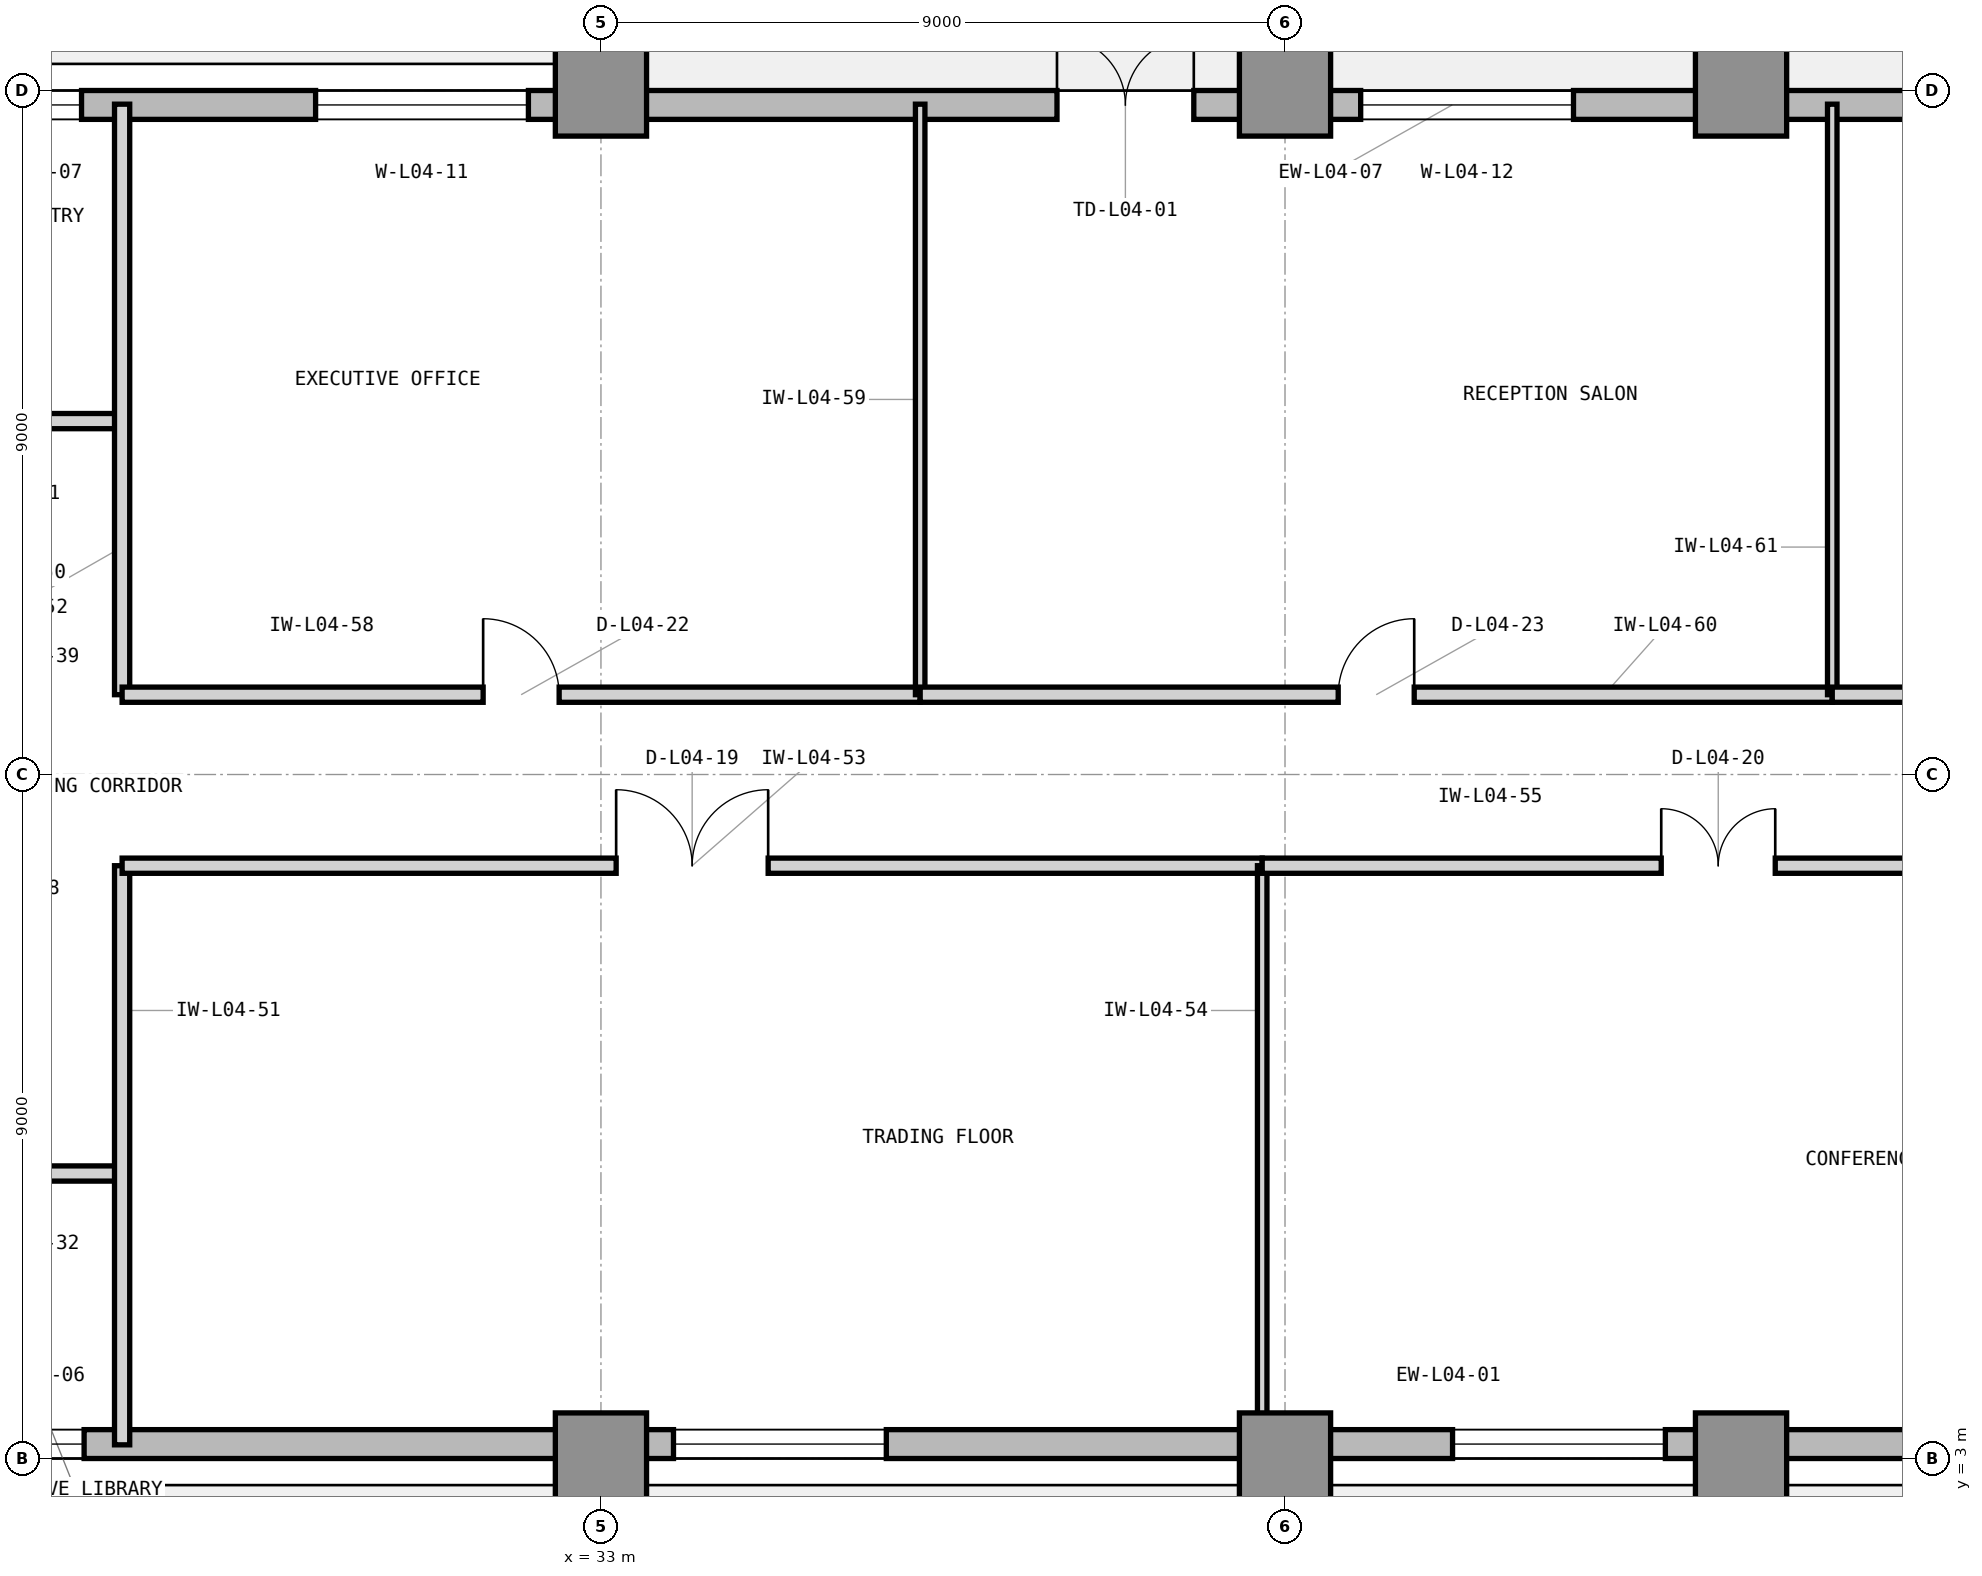
"""IFC4 building model, lengths in metres.
Left out: names, types, materials, properties, quantities, classifications, styles, units other than length and angle.
Written with IfcOpenShell. Run it as: python <this file> out.ifc"""

import sys

from ifc_helpers import new_model, si_unit, direction, frame, frame_2d, origin, origin_2d, place, context, subcontext, project, spatial, rectangle, extrude, element, fill, save


model = new_model("IFC4")
c1 = context("Model", 3, precision=1e-05, world=origin(), true_north=direction((0.0, 1.0)))
c2 = subcontext(c1, "Body", "Model", "MODEL_VIEW")
j1 = project(units=[si_unit("LENGTHUNIT", "METRE"), si_unit("PLANEANGLEUNIT", "RADIAN")], contexts=[c1])
p1 = place(None, origin())
s1 = spatial("IfcSite", under=j1, at=p1, CompositionType="ELEMENT")
p2 = place(p1, origin())
s2 = spatial("IfcBuilding", under=s1, at=p2, CompositionType="ELEMENT")
p3 = place(p2, frame((0.0, 0.0, 21.6)))
s3 = spatial("IfcBuildingStorey", under=s2, at=p3, CompositionType="ELEMENT", Elevation=21.6)
for number, where, z_axis, x_axis in (
    (1, (33.0, 3.0, 0.0), (0.0, 0.0, 1.0), (1.0, 0.0, 0.0)),
    (2, (33.0, 21.0, 0.0), (0.0, 0.0, 1.0), (1.0, 0.0, 0.0)),
    (3, (42.0, 3.0, 0.0), (0.0, 0.0, 1.0), (1.0, 0.0, 0.0)),
    (4, (42.0, 21.0, 0.0), (0.0, 0.0, 1.0), (1.0, 0.0, 0.0)),
    (5, (48.0, 3.0, 0.0), (0.0, 0.0, 1.0), (1.0, 0.0, 0.0)),
    (6, (48.0, 21.0, 0.0), (0.0, 0.0, 1.0), (1.0, 0.0, 0.0)),
):
    element("IfcColumn", number, at=place(p3, frame(where, z_axis=z_axis, x_axis=x_axis)), inside=s3, PredefinedType="COLUMN", context=c2, shape_type="SweptSolid", body=[
        extrude(rectangle(XDim=1.2, YDim=1.2, at=origin_2d()), origin(), (0.0, 0.0, 1.0), 4.2),
    ])
p4 = place(p3, frame((23.9, 3.19, 0.0), z_axis=(0.0, 0.0, 1.0), x_axis=(1.0, 0.0, 0.0)))
e7 = element("IfcWall", 7, at=p4, inside=s3, PredefinedType="STANDARD", context=c2, shape_type="SweptSolid", body=[
    extrude(rectangle(XDim=40.5, YDim=0.38, at=frame_2d((20.25, 0.0))), origin(), (0.0, 0.0, 1.0), 3.98),
])
p5 = place(p4, frame((1.1, 0.0, 0.85)))
e8 = element("IfcOpeningElement", 8, at=p5, cuts=e7, PredefinedType="OPENING", context=c2, shape_type="SweptSolid", body=[
    extrude(rectangle(XDim=1.2, YDim=2.45, at=frame_2d((0.6, 1.225))), frame((0.0, 0.2, 0.0), z_axis=(0.0, -1.0, 0.0), x_axis=(1.0, 0.0, 0.0)), (0.0, 0.0, 1.0), 0.4),
])
p6 = place(p4, frame((10.054, 0.0, 0.85)))
e9 = element("IfcOpeningElement", 9, at=p6, cuts=e7, PredefinedType="OPENING", context=c2, shape_type="SweptSolid", body=[
    extrude(rectangle(XDim=2.8, YDim=2.45, at=frame_2d((1.4, 1.225))), frame((0.0, 0.2, 0.0), z_axis=(0.0, -1.0, 0.0), x_axis=(1.0, 0.0, 0.0)), (0.0, 0.0, 1.0), 0.4),
])
p7 = place(p4, frame((20.304, 0.0, 0.85)))
e10 = element("IfcOpeningElement", 10, at=p7, cuts=e7, PredefinedType="OPENING", context=c2, shape_type="SweptSolid", body=[
    extrude(rectangle(XDim=2.8, YDim=2.45, at=frame_2d((1.4, 1.225))), frame((0.0, 0.2, 0.0), z_axis=(0.0, -1.0, 0.0), x_axis=(1.0, 0.0, 0.0)), (0.0, 0.0, 1.0), 0.4),
])
p8 = place(p4, frame((31.104, 0.0, 0.85)))
e11 = element("IfcOpeningElement", 11, at=p8, cuts=e7, PredefinedType="OPENING", context=c2, shape_type="SweptSolid", body=[
    extrude(rectangle(XDim=1.2, YDim=2.45, at=frame_2d((0.6, 1.225))), frame((0.0, 0.2, 0.0), z_axis=(0.0, -1.0, 0.0), x_axis=(1.0, 0.0, 0.0)), (0.0, 0.0, 1.0), 0.4),
])
p9 = place(p3, frame((64.4, 20.81, 0.0), z_axis=(0.0, 0.0, 1.0), x_axis=(-1.0, 0.0, 0.0)))
e12 = element("IfcWall", 12, at=p9, inside=s3, PredefinedType="STANDARD", context=c2, shape_type="SweptSolid", body=[
    extrude(rectangle(XDim=40.4, YDim=0.38, at=frame_2d((20.2, 0.0))), origin(), (0.0, 0.0, 1.0), 3.98),
])
p10 = place(p9, frame((23.6, 0.0, 0.0)))
e13 = element("IfcOpeningElement", 13, at=p10, cuts=e12, PredefinedType="OPENING", context=c2, shape_type="SweptSolid", body=[
    extrude(rectangle(XDim=1.8, YDim=2.35, at=frame_2d((0.9, 1.175))), frame((0.0, 0.2, 0.0), z_axis=(0.0, -1.0, 0.0), x_axis=(1.0, 0.0, 0.0)), (0.0, 0.0, 1.0), 0.4),
])
p11 = place(p9, frame((38.234, 0.0, 0.85)))
e14 = element("IfcOpeningElement", 14, at=p11, cuts=e12, PredefinedType="OPENING", context=c2, shape_type="SweptSolid", body=[
    extrude(rectangle(XDim=1.2, YDim=2.45, at=frame_2d((0.6, 1.225))), frame((0.0, 0.2, 0.0), z_axis=(0.0, -1.0, 0.0), x_axis=(1.0, 0.0, 0.0)), (0.0, 0.0, 1.0), 0.4),
])
p12 = place(p9, frame((32.354, 0.0, 0.85)))
e15 = element("IfcOpeningElement", 15, at=p12, cuts=e12, PredefinedType="OPENING", context=c2, shape_type="SweptSolid", body=[
    extrude(rectangle(XDim=2.8, YDim=2.45, at=frame_2d((1.4, 1.225))), frame((0.0, 0.2, 0.0), z_axis=(0.0, -1.0, 0.0), x_axis=(1.0, 0.0, 0.0)), (0.0, 0.0, 1.0), 0.4),
])
p13 = place(p9, frame((18.604, 0.0, 0.85)))
e16 = element("IfcOpeningElement", 16, at=p13, cuts=e12, PredefinedType="OPENING", context=c2, shape_type="SweptSolid", body=[
    extrude(rectangle(XDim=2.8, YDim=2.45, at=frame_2d((1.4, 1.225))), frame((0.0, 0.2, 0.0), z_axis=(0.0, -1.0, 0.0), x_axis=(1.0, 0.0, 0.0)), (0.0, 0.0, 1.0), 0.4),
])
p14 = place(p9, frame((11.154, 0.0, 0.85)))
e17 = element("IfcOpeningElement", 17, at=p14, cuts=e12, PredefinedType="OPENING", context=c2, shape_type="SweptSolid", body=[
    extrude(rectangle(XDim=1.2, YDim=2.45, at=frame_2d((0.6, 1.225))), frame((0.0, 0.2, 0.0), z_axis=(0.0, -1.0, 0.0), x_axis=(1.0, 0.0, 0.0)), (0.0, 0.0, 1.0), 0.4),
])
p15 = place(p3, frame((23.85, 6.75, 0.0), z_axis=(0.0, 0.0, 1.0), x_axis=(1.0, 0.0, 0.0)))
e18 = element("IfcWall", 18, at=p15, inside=s3, PredefinedType="PARTITIONING", context=c2, shape_type="SweptSolid", body=[
    extrude(rectangle(XDim=2.85, YDim=0.2, at=frame_2d((1.425, 0.0))), origin(), (0.0, 0.0, 1.0), 3.97),
])
p16 = place(p15, frame((0.7, 0.0, 0.0)))
e19 = element("IfcOpeningElement", 19, at=p16, cuts=e18, PredefinedType="OPENING", context=c2, shape_type="SweptSolid", body=[
    extrude(rectangle(XDim=1.0, YDim=2.15, at=frame_2d((0.5, 1.075))), frame((0.0, 0.11, 0.0), z_axis=(0.0, -1.0, 0.0), x_axis=(1.0, 0.0, 0.0)), (0.0, 0.0, 1.0), 0.22),
])
p17 = place(p3, frame((23.85, 16.65, 0.0), z_axis=(0.0, 0.0, 1.0), x_axis=(1.0, 0.0, 0.0)))
e20 = element("IfcWall", 20, at=p17, inside=s3, PredefinedType="PARTITIONING", context=c2, shape_type="SweptSolid", body=[
    extrude(rectangle(XDim=2.85, YDim=0.2, at=frame_2d((1.425, 0.0))), origin(), (0.0, 0.0, 1.0), 3.97),
])
p18 = place(p17, frame((0.7, 0.0, 0.0)))
e21 = element("IfcOpeningElement", 21, at=p18, cuts=e20, PredefinedType="OPENING", context=c2, shape_type="SweptSolid", body=[
    extrude(rectangle(XDim=1.0, YDim=2.15, at=frame_2d((0.5, 1.075))), frame((0.0, 0.11, 0.0), z_axis=(0.0, -1.0, 0.0), x_axis=(1.0, 0.0, 0.0)), (0.0, 0.0, 1.0), 0.22),
])
p19 = place(p3, frame((26.7, 3.18, 0.0), z_axis=(0.0, 0.0, 1.0), x_axis=(0.0, 1.0, 0.0)))
e22 = element("IfcWall", 22, at=p19, inside=s3, PredefinedType="PARTITIONING", context=c2, shape_type="SweptSolid", body=[
    extrude(rectangle(XDim=7.62, YDim=0.2, at=frame_2d((3.81, 0.0))), origin(), (0.0, 0.0, 1.0), 3.97),
])
p20 = place(p3, frame((26.7, 13.05, 0.0), z_axis=(0.0, 0.0, 1.0), x_axis=(0.0, 1.0, 0.0)))
e23 = element("IfcWall", 23, at=p20, inside=s3, PredefinedType="PARTITIONING", context=c2, shape_type="SweptSolid", body=[
    extrude(rectangle(XDim=7.77, YDim=0.2, at=frame_2d((3.885, 0.0))), origin(), (0.0, 0.0, 1.0), 3.97),
])
p21 = place(p3, frame((26.7, 10.8, 0.0), z_axis=(0.0, 0.0, 1.0), x_axis=(1.0, 0.0, 0.0)))
e24 = element("IfcWall", 24, at=p21, inside=s3, PredefinedType="PARTITIONING", context=c2, shape_type="SweptSolid", body=[
    extrude(rectangle(XDim=15.0, YDim=0.2, at=frame_2d((7.5, 0.0))), origin(), (0.0, 0.0, 1.0), 3.97),
])
p22 = place(p21, frame((6.5, 0.0, 0.0)))
e25 = element("IfcOpeningElement", 25, at=p22, cuts=e24, PredefinedType="OPENING", context=c2, shape_type="SweptSolid", body=[
    extrude(rectangle(XDim=2.0, YDim=2.5, at=frame_2d((1.0, 1.25))), frame((0.0, 0.11, 0.0), z_axis=(0.0, -1.0, 0.0), x_axis=(1.0, 0.0, 0.0)), (0.0, 0.0, 1.0), 0.22),
])
p23 = place(p3, frame((41.7, 3.18, 0.0), z_axis=(0.0, 0.0, 1.0), x_axis=(0.0, 1.0, 0.0)))
e26 = element("IfcWall", 26, at=p23, inside=s3, PredefinedType="PARTITIONING", context=c2, shape_type="SweptSolid", body=[
    extrude(rectangle(XDim=7.62, YDim=0.125, at=frame_2d((3.81, 0.0))), origin(), (0.0, 0.0, 1.0), 3.97),
])
p24 = place(p3, frame((41.7, 10.8, 0.0), z_axis=(0.0, 0.0, 1.0), x_axis=(1.0, 0.0, 0.0)))
e27 = element("IfcWall", 27, at=p24, inside=s3, PredefinedType="PARTITIONING", context=c2, shape_type="SweptSolid", body=[
    extrude(rectangle(XDim=12.0, YDim=0.2, at=frame_2d((6.0, 0.0))), origin(), (0.0, 0.0, 1.0), 3.97),
])
p25 = place(p24, frame((5.25, 0.0, 0.0)))
e28 = element("IfcOpeningElement", 28, at=p25, cuts=e27, PredefinedType="OPENING", context=c2, shape_type="SweptSolid", body=[
    extrude(rectangle(XDim=1.5, YDim=2.3, at=frame_2d((0.75, 1.15))), frame((0.0, 0.11, 0.0), z_axis=(0.0, -1.0, 0.0), x_axis=(1.0, 0.0, 0.0)), (0.0, 0.0, 1.0), 0.22),
])
p26 = place(p3, frame((26.7, 13.05, 0.0), z_axis=(0.0, 0.0, 1.0), x_axis=(1.0, 0.0, 0.0)))
e29 = element("IfcWall", 29, at=p26, inside=s3, PredefinedType="PARTITIONING", context=c2, shape_type="SweptSolid", body=[
    extrude(rectangle(XDim=10.5, YDim=0.2, at=frame_2d((5.25, 0.0))), origin(), (0.0, 0.0, 1.0), 3.97),
])
p27 = place(p26, frame((4.75, 0.0, 0.0)))
e30 = element("IfcOpeningElement", 30, at=p27, cuts=e29, PredefinedType="OPENING", context=c2, shape_type="SweptSolid", body=[
    extrude(rectangle(XDim=1.0, YDim=2.15, at=frame_2d((0.5, 1.075))), frame((0.0, 0.11, 0.0), z_axis=(0.0, -1.0, 0.0), x_axis=(1.0, 0.0, 0.0)), (0.0, 0.0, 1.0), 0.22),
])
p28 = place(p3, frame((37.2, 13.05, 0.0), z_axis=(0.0, 0.0, 1.0), x_axis=(0.0, 1.0, 0.0)))
e31 = element("IfcWall", 31, at=p28, inside=s3, PredefinedType="PARTITIONING", context=c2, shape_type="SweptSolid", body=[
    extrude(rectangle(XDim=7.77, YDim=0.125, at=frame_2d((3.885, 0.0))), origin(), (0.0, 0.0, 1.0), 3.97),
])
p29 = place(p3, frame((37.2, 13.05, 0.0), z_axis=(0.0, 0.0, 1.0), x_axis=(1.0, 0.0, 0.0)))
e32 = element("IfcWall", 32, at=p29, inside=s3, PredefinedType="PARTITIONING", context=c2, shape_type="SweptSolid", body=[
    extrude(rectangle(XDim=12.0, YDim=0.2, at=frame_2d((6.0, 0.0))), origin(), (0.0, 0.0, 1.0), 3.97),
])
p30 = place(p29, frame((5.5, 0.0, 0.0)))
e33 = element("IfcOpeningElement", 33, at=p30, cuts=e32, PredefinedType="OPENING", context=c2, shape_type="SweptSolid", body=[
    extrude(rectangle(XDim=1.0, YDim=2.15, at=frame_2d((0.5, 1.075))), frame((0.0, 0.11, 0.0), z_axis=(0.0, -1.0, 0.0), x_axis=(1.0, 0.0, 0.0)), (0.0, 0.0, 1.0), 0.22),
])
p31 = place(p3, frame((49.2, 13.05, 0.0), z_axis=(0.0, 0.0, 1.0), x_axis=(0.0, 1.0, 0.0)))
e34 = element("IfcWall", 34, at=p31, inside=s3, PredefinedType="PARTITIONING", context=c2, shape_type="SweptSolid", body=[
    extrude(rectangle(XDim=7.77, YDim=0.125, at=frame_2d((3.885, 0.0))), origin(), (0.0, 0.0, 1.0), 3.97),
])
p32 = place(p3, frame((49.2, 13.05, 0.0), z_axis=(0.0, 0.0, 1.0), x_axis=(1.0, 0.0, 0.0)))
e35 = element("IfcWall", 35, at=p32, inside=s3, PredefinedType="PARTITIONING", context=c2, shape_type="SweptSolid", body=[
    extrude(rectangle(XDim=9.3, YDim=0.2, at=frame_2d((4.65, 0.0))), origin(), (0.0, 0.0, 1.0), 3.97),
])
p33 = place(p32, frame((4.15, 0.0, 0.0)))
e36 = element("IfcOpeningElement", 36, at=p33, cuts=e35, PredefinedType="OPENING", context=c2, shape_type="SweptSolid", body=[
    extrude(rectangle(XDim=1.0, YDim=2.15, at=frame_2d((0.5, 1.075))), frame((0.0, 0.11, 0.0), z_axis=(0.0, -1.0, 0.0), x_axis=(1.0, 0.0, 0.0)), (0.0, 0.0, 1.0), 0.22),
])
p34 = place(p10, frame((1.8, 0.0, 0.0), z_axis=(0.0, 0.0, 1.0), x_axis=(-1.0, 0.0, 0.0)))
e37 = element("IfcDoor", 37, at=p34, inside=s3, OperationType="DOUBLE_DOOR_SINGLE_SWING", PredefinedType="DOOR", context=c2, shape_type="SweptSolid", body=[
    extrude(rectangle(XDim=1.8, YDim=2.35, at=frame_2d((0.9, 1.175))), frame((0.0, 0.025, 0.0), z_axis=(0.0, -1.0, 0.0), x_axis=(1.0, 0.0, 0.0)), (0.0, 0.0, 1.0), 0.05),
])
fill(e13, e37)
p35 = place(p22, origin())
e38 = element("IfcDoor", 38, at=p35, inside=s3, OperationType="DOUBLE_DOOR_SINGLE_SWING", PredefinedType="DOOR", context=c2, shape_type="SweptSolid", body=[
    extrude(rectangle(XDim=2.0, YDim=2.5, at=frame_2d((1.0, 1.25))), frame((0.0, 0.025, 0.0), z_axis=(0.0, -1.0, 0.0), x_axis=(1.0, 0.0, 0.0)), (0.0, 0.0, 1.0), 0.05),
])
fill(e25, e38)
p36 = place(p25, origin())
e39 = element("IfcDoor", 39, at=p36, inside=s3, OperationType="DOUBLE_DOOR_SINGLE_SWING", PredefinedType="DOOR", context=c2, shape_type="SweptSolid", body=[
    extrude(rectangle(XDim=1.5, YDim=2.3, at=frame_2d((0.75, 1.15))), frame((0.0, 0.025, 0.0), z_axis=(0.0, -1.0, 0.0), x_axis=(1.0, 0.0, 0.0)), (0.0, 0.0, 1.0), 0.05),
])
fill(e28, e39)
p37 = place(p27, origin())
e40 = element("IfcDoor", 40, at=p37, inside=s3, OperationType="SINGLE_SWING_LEFT", PredefinedType="DOOR", context=c2, shape_type="SweptSolid", body=[
    extrude(rectangle(XDim=1.0, YDim=2.15, at=frame_2d((0.5, 1.075))), frame((0.0, 0.025, 0.0), z_axis=(0.0, -1.0, 0.0), x_axis=(1.0, 0.0, 0.0)), (0.0, 0.0, 1.0), 0.05),
])
fill(e30, e40)
p38 = place(p30, origin())
e41 = element("IfcDoor", 41, at=p38, inside=s3, OperationType="SINGLE_SWING_RIGHT", PredefinedType="DOOR", context=c2, shape_type="SweptSolid", body=[
    extrude(rectangle(XDim=1.0, YDim=2.15, at=frame_2d((0.5, 1.075))), frame((0.0, 0.025, 0.0), z_axis=(0.0, -1.0, 0.0), x_axis=(1.0, 0.0, 0.0)), (0.0, 0.0, 1.0), 0.05),
])
fill(e33, e41)
p39 = place(p5, origin())
e42 = element("IfcWindow", 42, at=p39, inside=s3, PartitioningType="SINGLE_PANEL", PredefinedType="WINDOW", context=c2, shape_type="SweptSolid", body=[
    extrude(rectangle(XDim=1.2, YDim=2.45, at=frame_2d((0.6, 1.225))), frame((0.0, 0.11, 0.0), z_axis=(0.0, -1.0, 0.0), x_axis=(1.0, 0.0, 0.0)), (0.0, 0.0, 1.0), 0.06),
])
fill(e8, e42)
p40 = place(p11, origin())
e43 = element("IfcWindow", 43, at=p40, inside=s3, PartitioningType="SINGLE_PANEL", PredefinedType="WINDOW", context=c2, shape_type="SweptSolid", body=[
    extrude(rectangle(XDim=1.2, YDim=2.45, at=frame_2d((0.6, 1.225))), frame((0.0, 0.11, 0.0), z_axis=(0.0, -1.0, 0.0), x_axis=(1.0, 0.0, 0.0)), (0.0, 0.0, 1.0), 0.06),
])
fill(e14, e43)
p41 = place(p6, origin())
e44 = element("IfcWindow", 44, at=p41, inside=s3, PartitioningType="SINGLE_PANEL", PredefinedType="WINDOW", context=c2, shape_type="SweptSolid", body=[
    extrude(rectangle(XDim=2.8, YDim=2.45, at=frame_2d((1.4, 1.225))), frame((0.0, 0.11, 0.0), z_axis=(0.0, -1.0, 0.0), x_axis=(1.0, 0.0, 0.0)), (0.0, 0.0, 1.0), 0.06),
])
fill(e9, e44)
p42 = place(p7, origin())
e45 = element("IfcWindow", 45, at=p42, inside=s3, PartitioningType="SINGLE_PANEL", PredefinedType="WINDOW", context=c2, shape_type="SweptSolid", body=[
    extrude(rectangle(XDim=2.8, YDim=2.45, at=frame_2d((1.4, 1.225))), frame((0.0, 0.11, 0.0), z_axis=(0.0, -1.0, 0.0), x_axis=(1.0, 0.0, 0.0)), (0.0, 0.0, 1.0), 0.06),
])
fill(e10, e45)
p43 = place(p12, origin())
e46 = element("IfcWindow", 46, at=p43, inside=s3, PartitioningType="SINGLE_PANEL", PredefinedType="WINDOW", context=c2, shape_type="SweptSolid", body=[
    extrude(rectangle(XDim=2.8, YDim=2.45, at=frame_2d((1.4, 1.225))), frame((0.0, 0.11, 0.0), z_axis=(0.0, -1.0, 0.0), x_axis=(1.0, 0.0, 0.0)), (0.0, 0.0, 1.0), 0.06),
])
fill(e15, e46)
p44 = place(p13, origin())
e47 = element("IfcWindow", 47, at=p44, inside=s3, PartitioningType="SINGLE_PANEL", PredefinedType="WINDOW", context=c2, shape_type="SweptSolid", body=[
    extrude(rectangle(XDim=2.8, YDim=2.45, at=frame_2d((1.4, 1.225))), frame((0.0, 0.11, 0.0), z_axis=(0.0, -1.0, 0.0), x_axis=(1.0, 0.0, 0.0)), (0.0, 0.0, 1.0), 0.06),
])
fill(e16, e47)
save(model, sys.argv[1])
